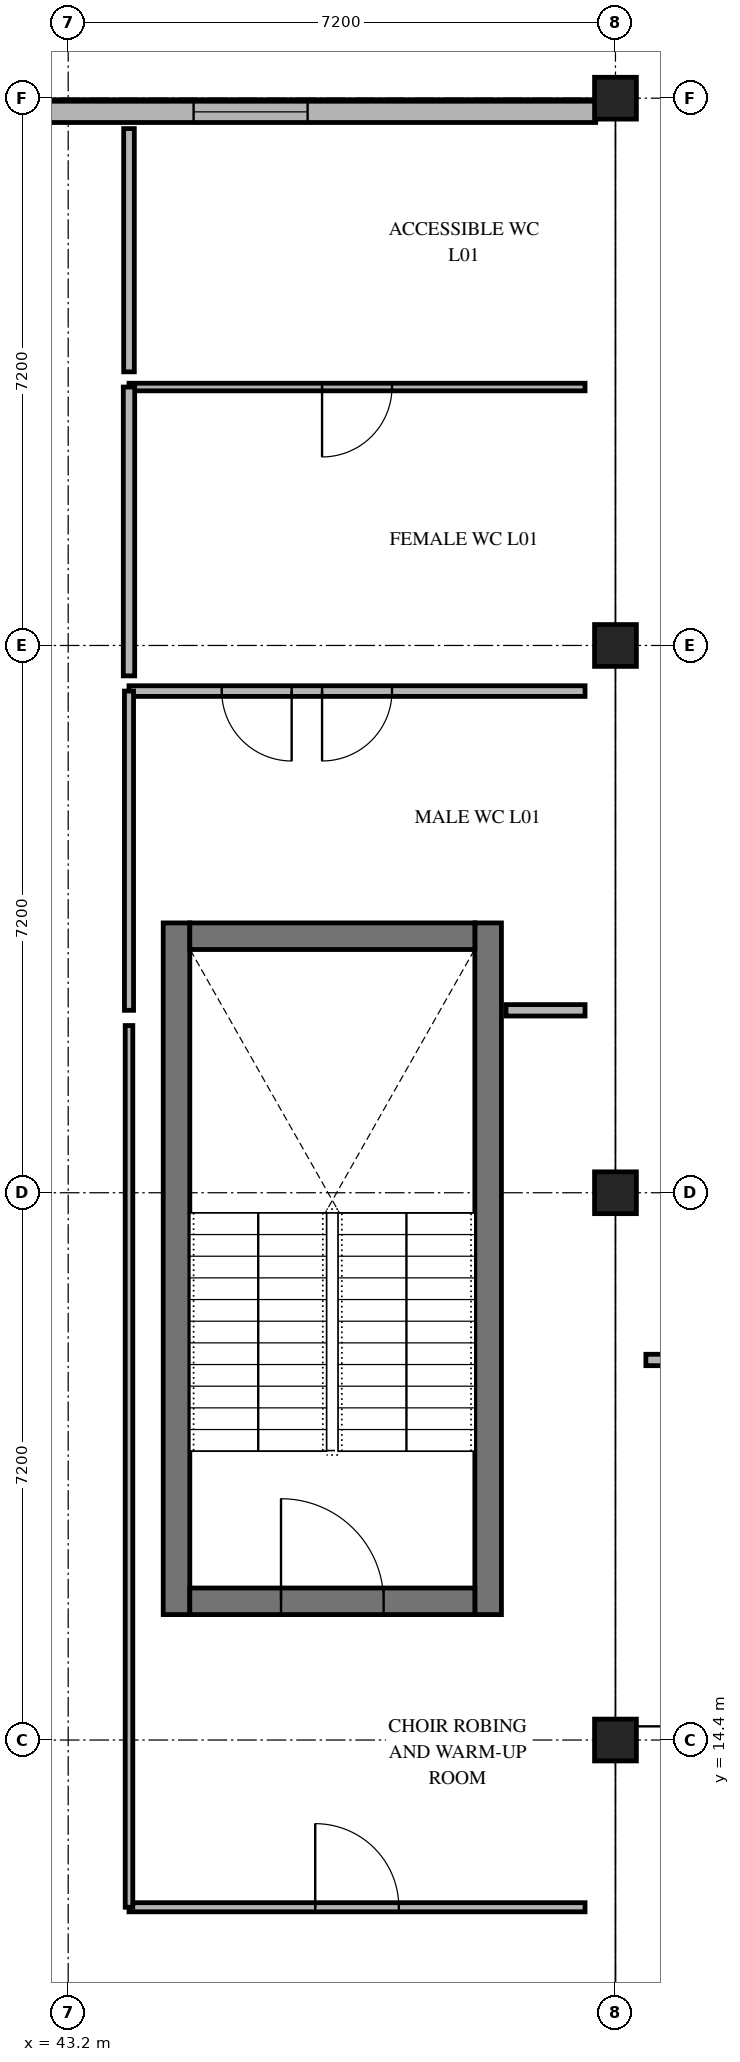
"""IFC4 building model, lengths in metres.
Left out: names, types, materials, properties, quantities, classifications, styles, units other than length and angle.
Written with IfcOpenShell. Run it as: python <this file> out.ifc"""

import sys

from ifc_helpers import new_model, si_unit, direction, frame, frame_2d, origin, origin_2d, place, context, subcontext, project, spatial, rectangle, extrude, element, fill, save


model = new_model("IFC4")
c1 = context("Model", 3, precision=1e-05, world=origin(), true_north=direction((0.0, 1.0)))
c2 = subcontext(c1, "Body", "Model", "MODEL_VIEW")
j1 = project(units=[si_unit("LENGTHUNIT", "METRE"), si_unit("PLANEANGLEUNIT", "RADIAN")], contexts=[c1])
p1 = place(None, origin())
s1 = spatial("IfcSite", under=j1, at=p1, CompositionType="ELEMENT")
p2 = place(p1, origin())
s2 = spatial("IfcBuilding", under=s1, at=p2, CompositionType="ELEMENT")
p3 = place(p2, frame((0.0, 0.0, 4.5)))
s3 = spatial("IfcBuildingStorey", under=s2, at=p3, CompositionType="ELEMENT", Elevation=4.5)
for number, where, z_axis, x_axis in (
    (1, (50.4, 14.4, 0.0), (0.0, 0.0, 1.0), (1.0, 0.0, 0.0)),
    (2, (50.4, 21.6, 0.0), (0.0, 0.0, 1.0), (1.0, 0.0, 0.0)),
    (3, (50.4, 28.8, 0.0), (0.0, 0.0, 1.0), (1.0, 0.0, 0.0)),
    (4, (50.4, 36.0, 0.0), (0.0, 0.0, 1.0), (1.0, 0.0, 0.0)),
):
    element("IfcColumn", number, at=place(p3, frame(where, z_axis=z_axis, x_axis=x_axis)), inside=s3, PredefinedType="COLUMN", context=c2, shape_type="SweptSolid", body=[
        extrude(rectangle(XDim=0.55, YDim=0.55, at=origin_2d()), origin(), (0.0, 0.0, 1.0), 4.2),
    ])
p4 = place(p3, frame((41.06, 35.82, 0.0), z_axis=(0.0, 0.0, 1.0), x_axis=(1.0, 0.0, 0.0)))
e5 = element("IfcWall", 5, at=p4, inside=s3, PredefinedType="SOLIDWALL", context=c2, shape_type="SweptSolid", body=[
    extrude(rectangle(XDim=9.08, YDim=0.28, at=frame_2d((4.54, 0.0))), origin(), (0.0, 0.0, 1.0), 3.15),
])
p5 = place(p4, frame((3.79, 0.0, 0.75)))
e6 = element("IfcOpeningElement", 6, at=p5, cuts=e5, PredefinedType="OPENING", context=c2, shape_type="SweptSolid", body=[
    extrude(rectangle(XDim=1.5, YDim=1.65, at=frame_2d((0.75, 0.825))), frame((0.0, 0.15, 0.0), z_axis=(0.0, -1.0, 0.0), x_axis=(1.0, 0.0, 0.0)), (0.0, 0.0, 1.0), 0.3),
])
p6 = place(p3, frame((50.25, 26.22, 0.0), z_axis=(0.0, 0.0, 1.0), x_axis=(1.0, 0.0, 0.0)))
e7 = element("IfcWall", 7, at=p6, inside=s3, PredefinedType="SOLIDWALL", context=c2, shape_type="SweptSolid", body=[
    extrude(rectangle(XDim=57.9, YDim=0.24, at=frame_2d((28.95, 0.0))), origin(), (0.0, 0.0, 1.0), 3.2),
])
p7 = place(p6, frame((27.9, 0.0, 0.75)))
e8 = element("IfcOpeningElement", 8, at=p7, cuts=e7, PredefinedType="OPENING", context=c2, shape_type="SweptSolid", body=[
    extrude(rectangle(XDim=2.1, YDim=1.65, at=frame_2d((1.05, 0.825))), frame((0.0, 0.13, 0.0), z_axis=(0.0, -1.0, 0.0), x_axis=(1.0, 0.0, 0.0)), (0.0, 0.0, 1.0), 0.26),
])
for number, where, z_axis, x_axis in (
    (9, (48.725, 16.05, 0.0), (0.0, 0.0, 1.0), (0.0, 1.0, 0.0)),
    (10, (44.625, 25.15, 0.0), (0.0, 0.0, 1.0), (0.0, -1.0, 0.0)),
):
    element("IfcWall", number, at=place(p3, frame(where, z_axis=z_axis, x_axis=x_axis)), inside=s3, PredefinedType="SHEAR", context=c2, shape_type="SweptSolid", body=[
        extrude(rectangle(XDim=9.1, YDim=0.35, at=frame_2d((4.55, 0.0))), origin(), (0.0, 0.0, 1.0), 3.95),
    ])
p8 = place(p3, frame((48.55, 24.975, 0.0), z_axis=(0.0, 0.0, 1.0), x_axis=(-1.0, 0.0, 0.0)))
e11 = element("IfcWall", 11, at=p8, inside=s3, PredefinedType="SHEAR", context=c2, shape_type="SweptSolid", body=[
    extrude(rectangle(XDim=3.75, YDim=0.35, at=frame_2d((1.875, 0.0))), origin(), (0.0, 0.0, 1.0), 3.95),
])
p9 = place(p3, frame((44.8, 16.225, 0.0), z_axis=(0.0, 0.0, 1.0), x_axis=(1.0, 0.0, 0.0)))
e12 = element("IfcWall", 12, at=p9, inside=s3, PredefinedType="SHEAR", context=c2, shape_type="SweptSolid", body=[
    extrude(rectangle(XDim=3.75, YDim=0.35, at=frame_2d((1.875, 0.0))), origin(), (0.0, 0.0, 1.0), 3.95),
])
p10 = place(p9, frame((1.2, 0.0, 0.0)))
e13 = element("IfcOpeningElement", 13, at=p10, cuts=e12, PredefinedType="OPENING", context=c2, shape_type="SweptSolid", body=[
    extrude(rectangle(XDim=1.35, YDim=2.2, at=frame_2d((0.675, 1.1))), frame((0.0, 0.185, 0.0), z_axis=(0.0, -1.0, 0.0), x_axis=(1.0, 0.0, 0.0)), (0.0, 0.0, 1.0), 0.37),
])
p11 = place(p3, frame((44.0, 12.2, 0.0), z_axis=(0.0, 0.0, 1.0), x_axis=(1.0, 0.0, 0.0)))
e14 = element("IfcWall", 14, at=p11, inside=s3, PredefinedType="PARTITIONING", context=c2, shape_type="SweptSolid", body=[
    extrude(rectangle(XDim=6.0, YDim=0.12, at=frame_2d((3.0, 0.0))), origin(), (0.0, 0.0, 1.0), 3.95),
])
p12 = place(p11, frame((2.45, 0.0, 0.0)))
e15 = element("IfcOpeningElement", 15, at=p12, cuts=e14, PredefinedType="OPENING", context=c2, shape_type="SweptSolid", body=[
    extrude(rectangle(XDim=1.1, YDim=2.15, at=frame_2d((0.55, 1.075))), frame((0.0, 0.07, 0.0), z_axis=(0.0, -1.0, 0.0), x_axis=(1.0, 0.0, 0.0)), (0.0, 0.0, 1.0), 0.14),
])
p13 = place(p3, frame((44.0, 23.8, 0.0), z_axis=(0.0, 0.0, 1.0), x_axis=(0.0, -1.0, 0.0)))
e16 = element("IfcWall", 16, at=p13, inside=s3, PredefinedType="PARTITIONING", context=c2, shape_type="SweptSolid", body=[
    extrude(rectangle(XDim=11.6, YDim=0.1, at=frame_2d((5.8, 0.0))), origin(), (0.0, 0.0, 1.0), 3.35),
])
p14 = place(p3, frame((68.0, 19.4, 0.0), z_axis=(0.0, 0.0, 1.0), x_axis=(-1.0, 0.0, 0.0)))
e17 = element("IfcWall", 17, at=p14, inside=s3, PredefinedType="PARTITIONING", context=c2, shape_type="SweptSolid", body=[
    extrude(rectangle(XDim=17.2, YDim=0.15, at=frame_2d((8.6, 0.0))), origin(), (0.0, 0.0, 1.0), 3.95),
])
p15 = place(p14, frame((13.63, 0.0, 0.0)))
e18 = element("IfcOpeningElement", 18, at=p15, cuts=e17, PredefinedType="OPENING", context=c2, shape_type="SweptSolid", body=[
    extrude(rectangle(XDim=1.0, YDim=2.15, at=frame_2d((0.5, 1.075))), frame((0.0, 0.085, 0.0), z_axis=(0.0, -1.0, 0.0), x_axis=(1.0, 0.0, 0.0)), (0.0, 0.0, 1.0), 0.17),
])
p16 = place(p3, frame((48.96, 24.0, 0.0), z_axis=(0.0, 0.0, 1.0), x_axis=(1.0, 0.0, 0.0)))
e19 = element("IfcWall", 19, at=p16, inside=s3, PredefinedType="PARTITIONING", context=c2, shape_type="SweptSolid", body=[
    extrude(rectangle(XDim=1.04, YDim=0.15, at=frame_2d((0.52, 0.0))), origin(), (0.0, 0.0, 1.0), 3.95),
])
p17 = place(p3, frame((50.0, 28.2, 0.0), z_axis=(0.0, 0.0, 1.0), x_axis=(-1.0, 0.0, 0.0)))
e20 = element("IfcWall", 20, at=p17, inside=s3, PredefinedType="PARTITIONING", context=c2, shape_type="SweptSolid", body=[
    extrude(rectangle(XDim=6.0, YDim=0.14, at=frame_2d((3.0, 0.0))), origin(), (0.0, 0.0, 1.0), 3.95),
])
p18 = place(p17, frame((2.54, 0.0, 0.0)))
e21 = element("IfcOpeningElement", 21, at=p18, cuts=e20, PredefinedType="OPENING", context=c2, shape_type="SweptSolid", body=[
    extrude(rectangle(XDim=0.92, YDim=2.1, at=frame_2d((0.46, 1.05))), frame((0.0, 0.08, 0.0), z_axis=(0.0, -1.0, 0.0), x_axis=(1.0, 0.0, 0.0)), (0.0, 0.0, 1.0), 0.16),
])
p19 = place(p17, frame((3.86, 0.0, 0.0)))
e22 = element("IfcOpeningElement", 22, at=p19, cuts=e20, PredefinedType="OPENING", context=c2, shape_type="SweptSolid", body=[
    extrude(rectangle(XDim=0.92, YDim=2.1, at=frame_2d((0.46, 1.05))), frame((0.0, 0.08, 0.0), z_axis=(0.0, -1.0, 0.0), x_axis=(1.0, 0.0, 0.0)), (0.0, 0.0, 1.0), 0.16),
])
p20 = place(p3, frame((44.0, 28.2, 0.0), z_axis=(0.0, 0.0, 1.0), x_axis=(0.0, -1.0, 0.0)))
e23 = element("IfcWall", 23, at=p20, inside=s3, PredefinedType="PARTITIONING", context=c2, shape_type="SweptSolid", body=[
    extrude(rectangle(XDim=4.2, YDim=0.12, at=frame_2d((2.1, 0.0))), origin(), (0.0, 0.0, 1.0), 3.27),
])
p21 = place(p3, frame((50.0, 32.2, 0.0), z_axis=(0.0, 0.0, 1.0), x_axis=(-1.0, 0.0, 0.0)))
e24 = element("IfcWall", 24, at=p21, inside=s3, PredefinedType="PARTITIONING", context=c2, shape_type="SweptSolid", body=[
    extrude(rectangle(XDim=6.0, YDim=0.1, at=frame_2d((3.0, 0.0))), origin(), (0.0, 0.0, 1.0), 3.95),
])
p22 = place(p21, frame((2.54, 0.0, 0.0)))
e25 = element("IfcOpeningElement", 25, at=p22, cuts=e24, PredefinedType="OPENING", context=c2, shape_type="SweptSolid", body=[
    extrude(rectangle(XDim=0.92, YDim=2.1, at=frame_2d((0.46, 1.05))), frame((0.0, 0.06, 0.0), z_axis=(0.0, -1.0, 0.0), x_axis=(1.0, 0.0, 0.0)), (0.0, 0.0, 1.0), 0.12),
])
p23 = place(p3, frame((44.0, 32.2, 0.0), z_axis=(0.0, 0.0, 1.0), x_axis=(0.0, -1.0, 0.0)))
e26 = element("IfcWall", 26, at=p23, inside=s3, PredefinedType="PARTITIONING", context=c2, shape_type="SweptSolid", body=[
    extrude(rectangle(XDim=3.8, YDim=0.15, at=frame_2d((1.9, 0.0))), origin(), (0.0, 0.0, 1.0), 3.2),
])
p24 = place(p3, frame((44.0, 35.6, 0.0), z_axis=(0.0, 0.0, 1.0), x_axis=(0.0, -1.0, 0.0)))
e27 = element("IfcWall", 27, at=p24, inside=s3, PredefinedType="PARTITIONING", context=c2, shape_type="SweptSolid", body=[
    extrude(rectangle(XDim=3.2, YDim=0.14, at=frame_2d((1.6, 0.0))), origin(), (0.0, 0.0, 1.0), 3.19),
])
p25 = place(p5, origin())
e28 = element("IfcWindow", 28, at=p25, inside=s3, PartitioningType="SINGLE_PANEL", PredefinedType="WINDOW", context=c2, shape_type="SweptSolid", body=[
    extrude(rectangle(XDim=1.5, YDim=1.65, at=frame_2d((0.75, 0.825))), frame((0.0, 0.03, 0.0), z_axis=(0.0, -1.0, 0.0), x_axis=(1.0, 0.0, 0.0)), (0.0, 0.0, 1.0), 0.06),
])
fill(e6, e28)
p26 = place(p10, origin())
e29 = element("IfcDoor", 29, at=p26, inside=s3, OperationType="SINGLE_SWING_LEFT", PredefinedType="DOOR", context=c2, shape_type="SweptSolid", body=[
    extrude(rectangle(XDim=1.35, YDim=2.2, at=frame_2d((0.675, 1.1))), frame((0.0, 0.025, 0.0), z_axis=(0.0, -1.0, 0.0), x_axis=(1.0, 0.0, 0.0)), (0.0, 0.0, 1.0), 0.05),
])
fill(e13, e29)
p27 = place(p12, origin())
e30 = element("IfcDoor", 30, at=p27, inside=s3, OperationType="SINGLE_SWING_LEFT", PredefinedType="DOOR", context=c2, shape_type="SweptSolid", body=[
    extrude(rectangle(XDim=1.1, YDim=2.15, at=frame_2d((0.55, 1.075))), frame((0.0, 0.025, 0.0), z_axis=(0.0, -1.0, 0.0), x_axis=(1.0, 0.0, 0.0)), (0.0, 0.0, 1.0), 0.05),
])
fill(e15, e30)
p28 = place(p18, origin())
e31 = element("IfcDoor", 31, at=p28, inside=s3, OperationType="SINGLE_SWING_RIGHT", PredefinedType="DOOR", context=c2, shape_type="SweptSolid", body=[
    extrude(rectangle(XDim=0.92, YDim=2.1, at=frame_2d((0.46, 1.05))), frame((0.0, 0.025, 0.0), z_axis=(0.0, -1.0, 0.0), x_axis=(1.0, 0.0, 0.0)), (0.0, 0.0, 1.0), 0.05),
])
fill(e21, e31)
p29 = place(p19, origin())
e32 = element("IfcDoor", 32, at=p29, inside=s3, OperationType="SINGLE_SWING_LEFT", PredefinedType="DOOR", context=c2, shape_type="SweptSolid", body=[
    extrude(rectangle(XDim=0.92, YDim=2.1, at=frame_2d((0.46, 1.05))), frame((0.0, 0.025, 0.0), z_axis=(0.0, -1.0, 0.0), x_axis=(1.0, 0.0, 0.0)), (0.0, 0.0, 1.0), 0.05),
])
fill(e22, e32)
p30 = place(p22, origin())
e33 = element("IfcDoor", 33, at=p30, inside=s3, OperationType="SINGLE_SWING_RIGHT", PredefinedType="DOOR", context=c2, shape_type="SweptSolid", body=[
    extrude(rectangle(XDim=0.92, YDim=2.1, at=frame_2d((0.46, 1.05))), frame((0.0, 0.025, 0.0), z_axis=(0.0, -1.0, 0.0), x_axis=(1.0, 0.0, 0.0)), (0.0, 0.0, 1.0), 0.05),
])
fill(e25, e33)
save(model, sys.argv[1])
